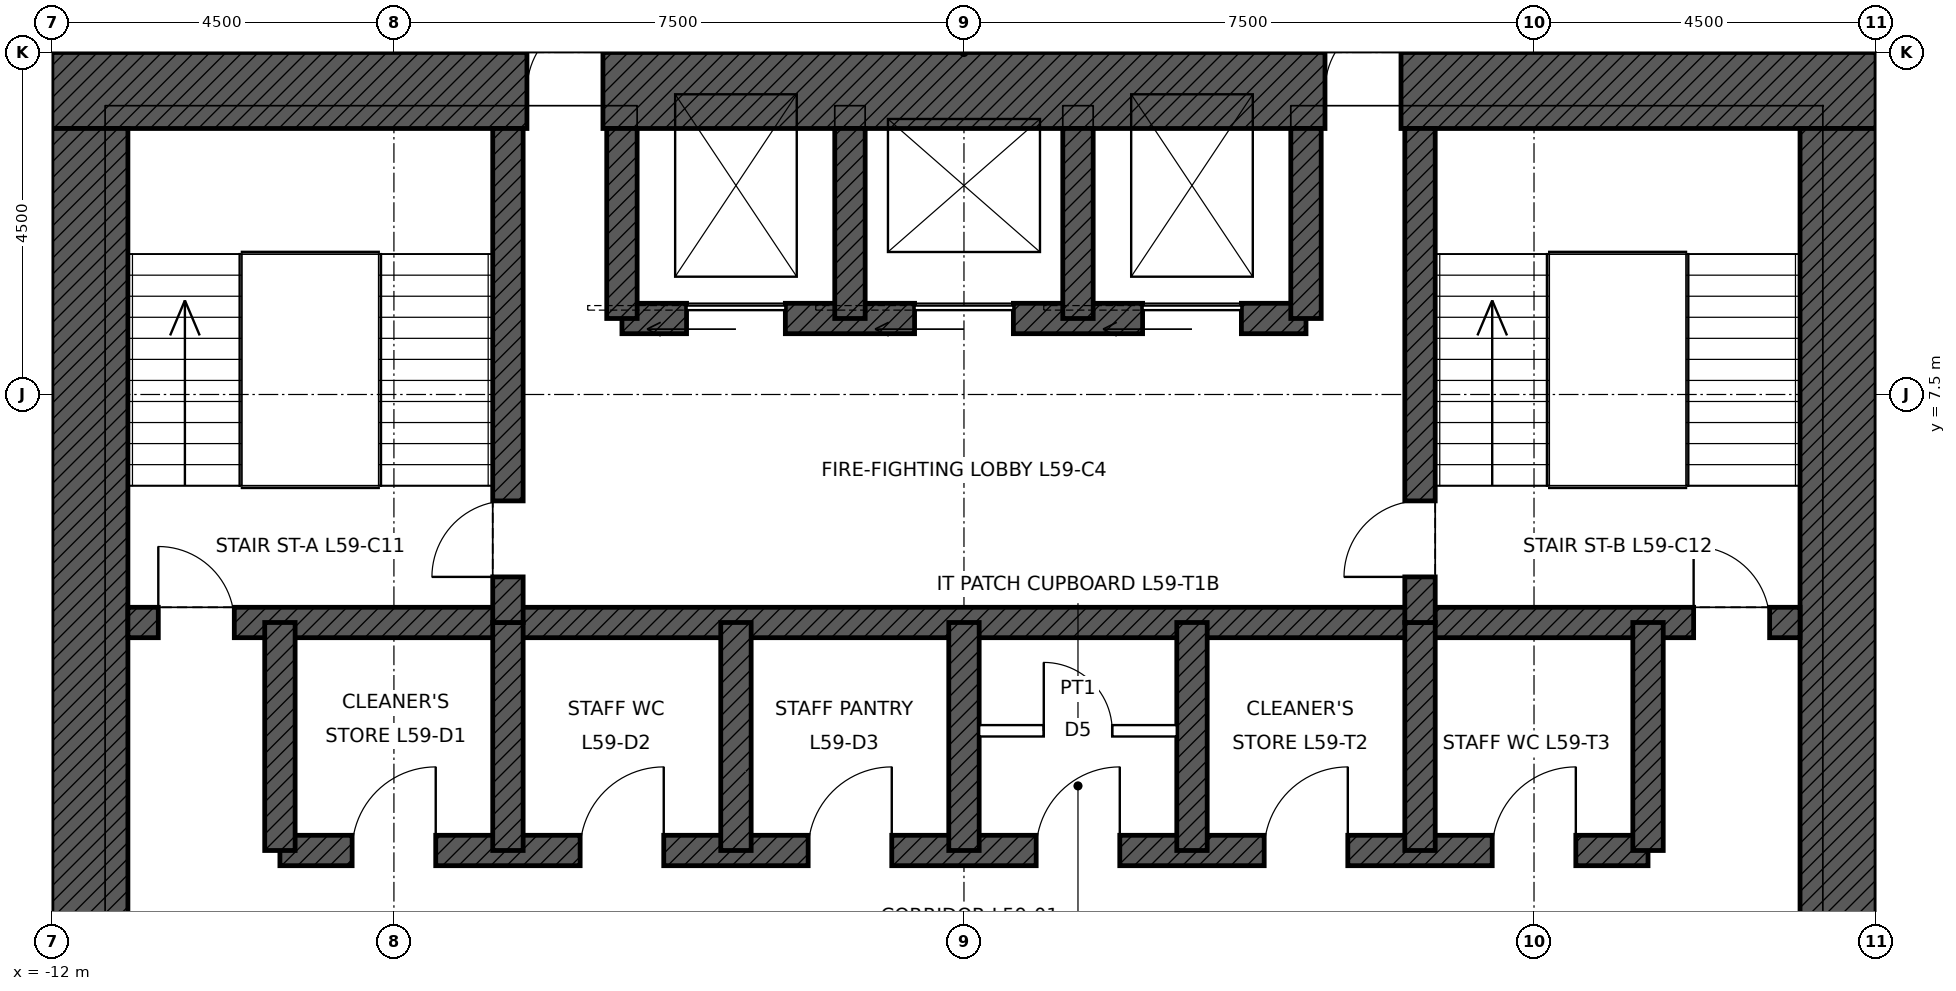
"""IFC4 building model, lengths in metres.
Left out: names, types, materials, properties, quantities, classifications, styles, units other than length and angle.
Written with IfcOpenShell. Run it as: python <this file> out.ifc"""

import sys

from ifc_helpers import new_model, si_unit, direction, frame, frame_2d, origin, place, context, subcontext, project, spatial, rectangle, extrude, element, fill, save


model = new_model("IFC4")
c1 = context("Model", 3, precision=1e-05, world=origin(), true_north=direction((0.0, 1.0)))
c2 = subcontext(c1, "Body", "Model", "MODEL_VIEW")
j1 = project(units=[si_unit("LENGTHUNIT", "METRE"), si_unit("PLANEANGLEUNIT", "RADIAN")], contexts=[c1])
p1 = place(None, origin())
s1 = spatial("IfcSite", under=j1, at=p1, CompositionType="ELEMENT")
p2 = place(p1, origin())
s2 = spatial("IfcBuilding", under=s1, at=p2, CompositionType="ELEMENT")
p3 = place(p2, frame((0.0, 0.0, 271.9)))
s3 = spatial("IfcBuildingStorey", under=s2, at=p3, CompositionType="ELEMENT", Elevation=271.9)
p4 = place(p3, frame((-12.0, 11.5, 0.0), z_axis=(0.0, 0.0, 1.0), x_axis=(1.0, 0.0, 0.0)))
e1 = element("IfcWall", 1, at=p4, inside=s3, PredefinedType="SHEAR", context=c2, shape_type="SweptSolid", body=[
    extrude(rectangle(XDim=24.0, YDim=1.0, at=frame_2d((12.0, 0.0))), origin(), (0.0, 0.0, 1.0), 4.0),
])
p5 = place(p4, frame((6.25, 0.0, 0.0)))
e2 = element("IfcOpeningElement", 2, at=p5, cuts=e1, PredefinedType="OPENING", context=c2, shape_type="SweptSolid", body=[
    extrude(rectangle(XDim=1.0, YDim=2.4, at=frame_2d((0.5, 1.2))), frame((0.0, 0.51, 0.0), z_axis=(0.0, -1.0, 0.0), x_axis=(1.0, 0.0, 0.0)), (0.0, 0.0, 1.0), 1.02),
])
p6 = place(p4, frame((16.75, 0.0, 0.0)))
e3 = element("IfcOpeningElement", 3, at=p6, cuts=e1, PredefinedType="OPENING", context=c2, shape_type="SweptSolid", body=[
    extrude(rectangle(XDim=1.0, YDim=2.4, at=frame_2d((0.5, 1.2))), frame((0.0, 0.51, 0.0), z_axis=(0.0, -1.0, 0.0), x_axis=(1.0, 0.0, 0.0)), (0.0, 0.0, 1.0), 1.02),
])
p7 = place(p3, frame((11.5, 11.0, 0.0), z_axis=(0.0, 0.0, 1.0), x_axis=(0.0, -1.0, 0.0)))
e4 = element("IfcWall", 4, at=p7, inside=s3, PredefinedType="SHEAR", context=c2, shape_type="SweptSolid", body=[
    extrude(rectangle(XDim=22.0, YDim=1.0, at=frame_2d((11.0, 0.0))), origin(), (0.0, 0.0, 1.0), 4.0),
])
p8 = place(p7, frame((10.5, 0.0, 0.0)))
e5 = element("IfcOpeningElement", 5, at=p8, cuts=e4, PredefinedType="OPENING", context=c2, shape_type="SweptSolid", body=[
    extrude(rectangle(XDim=1.0, YDim=2.4, at=frame_2d((0.5, 1.2))), frame((0.0, 0.51, 0.0), z_axis=(0.0, -1.0, 0.0), x_axis=(1.0, 0.0, 0.0)), (0.0, 0.0, 1.0), 1.02),
])
p9 = place(p3, frame((-11.5, -11.0, 0.0), z_axis=(0.0, 0.0, 1.0), x_axis=(0.0, 1.0, 0.0)))
e6 = element("IfcWall", 6, at=p9, inside=s3, PredefinedType="SHEAR", context=c2, shape_type="SweptSolid", body=[
    extrude(rectangle(XDim=22.0, YDim=1.0, at=frame_2d((11.0, 0.0))), origin(), (0.0, 0.0, 1.0), 4.0),
])
p10 = place(p9, frame((10.5, 0.0, 0.0)))
e7 = element("IfcOpeningElement", 7, at=p10, cuts=e6, PredefinedType="OPENING", context=c2, shape_type="SweptSolid", body=[
    extrude(rectangle(XDim=1.0, YDim=2.4, at=frame_2d((0.5, 1.2))), frame((0.0, 0.51, 0.0), z_axis=(0.0, -1.0, 0.0), x_axis=(1.0, 0.0, 0.0)), (0.0, 0.0, 1.0), 1.02),
])
p11 = place(p3, frame((-11.0, 4.5, 0.0), z_axis=(0.0, 0.0, 1.0), x_axis=(1.0, 0.0, 0.0)))
e8 = element("IfcWall", 8, at=p11, inside=s3, PredefinedType="SHEAR", context=c2, shape_type="SweptSolid", body=[
    extrude(rectangle(XDim=22.0, YDim=0.4, at=frame_2d((11.0, 0.0))), origin(), (0.0, 0.0, 1.0), 4.0),
])
p12 = place(p11, frame((0.4, 0.0, 0.0)))
e9 = element("IfcOpeningElement", 9, at=p12, cuts=e8, PredefinedType="OPENING", context=c2, shape_type="SweptSolid", body=[
    extrude(rectangle(XDim=1.0, YDim=2.1, at=frame_2d((0.5, 1.05))), frame((0.0, 0.21, 0.0), z_axis=(0.0, -1.0, 0.0), x_axis=(1.0, 0.0, 0.0)), (0.0, 0.0, 1.0), 0.42),
])
p13 = place(p11, frame((20.6, 0.0, 0.0)))
e10 = element("IfcOpeningElement", 10, at=p13, cuts=e8, PredefinedType="OPENING", context=c2, shape_type="SweptSolid", body=[
    extrude(rectangle(XDim=1.0, YDim=2.1, at=frame_2d((0.5, 1.05))), frame((0.0, 0.21, 0.0), z_axis=(0.0, -1.0, 0.0), x_axis=(1.0, 0.0, 0.0)), (0.0, 0.0, 1.0), 0.42),
])
p14 = place(p3, frame((-9.0, 1.5, 0.0), z_axis=(0.0, 0.0, 1.0), x_axis=(1.0, 0.0, 0.0)))
e11 = element("IfcWall", 11, at=p14, inside=s3, PredefinedType="SHEAR", context=c2, shape_type="SweptSolid", body=[
    extrude(rectangle(XDim=18.0, YDim=0.4, at=frame_2d((9.0, 0.0))), origin(), (0.0, 0.0, 1.0), 4.0),
])
p15 = place(p14, frame((0.95, 0.0, 0.0)))
e12 = element("IfcOpeningElement", 12, at=p15, cuts=e11, PredefinedType="OPENING", context=c2, shape_type="SweptSolid", body=[
    extrude(rectangle(XDim=1.1, YDim=2.1, at=frame_2d((0.55, 1.05))), frame((0.0, 0.21, 0.0), z_axis=(0.0, -1.0, 0.0), x_axis=(1.0, 0.0, 0.0)), (0.0, 0.0, 1.0), 0.42),
])
p16 = place(p14, frame((3.95, 0.0, 0.0)))
e13 = element("IfcOpeningElement", 13, at=p16, cuts=e11, PredefinedType="OPENING", context=c2, shape_type="SweptSolid", body=[
    extrude(rectangle(XDim=1.1, YDim=2.1, at=frame_2d((0.55, 1.05))), frame((0.0, 0.21, 0.0), z_axis=(0.0, -1.0, 0.0), x_axis=(1.0, 0.0, 0.0)), (0.0, 0.0, 1.0), 0.42),
])
p17 = place(p14, frame((6.95, 0.0, 0.0)))
e14 = element("IfcOpeningElement", 14, at=p17, cuts=e11, PredefinedType="OPENING", context=c2, shape_type="SweptSolid", body=[
    extrude(rectangle(XDim=1.1, YDim=2.1, at=frame_2d((0.55, 1.05))), frame((0.0, 0.21, 0.0), z_axis=(0.0, -1.0, 0.0), x_axis=(1.0, 0.0, 0.0)), (0.0, 0.0, 1.0), 0.42),
])
p18 = place(p14, frame((9.95, 0.0, 0.0)))
e15 = element("IfcOpeningElement", 15, at=p18, cuts=e11, PredefinedType="OPENING", context=c2, shape_type="SweptSolid", body=[
    extrude(rectangle(XDim=1.1, YDim=2.1, at=frame_2d((0.55, 1.05))), frame((0.0, 0.21, 0.0), z_axis=(0.0, -1.0, 0.0), x_axis=(1.0, 0.0, 0.0)), (0.0, 0.0, 1.0), 0.42),
])
p19 = place(p14, frame((12.95, 0.0, 0.0)))
e16 = element("IfcOpeningElement", 16, at=p19, cuts=e11, PredefinedType="OPENING", context=c2, shape_type="SweptSolid", body=[
    extrude(rectangle(XDim=1.1, YDim=2.1, at=frame_2d((0.55, 1.05))), frame((0.0, 0.21, 0.0), z_axis=(0.0, -1.0, 0.0), x_axis=(1.0, 0.0, 0.0)), (0.0, 0.0, 1.0), 0.42),
])
p20 = place(p14, frame((15.95, 0.0, 0.0)))
e17 = element("IfcOpeningElement", 17, at=p20, cuts=e11, PredefinedType="OPENING", context=c2, shape_type="SweptSolid", body=[
    extrude(rectangle(XDim=1.1, YDim=2.1, at=frame_2d((0.55, 1.05))), frame((0.0, 0.21, 0.0), z_axis=(0.0, -1.0, 0.0), x_axis=(1.0, 0.0, 0.0)), (0.0, 0.0, 1.0), 0.42),
])
p21 = place(p3, frame((-4.5, 8.5, 0.0), z_axis=(0.0, 0.0, 1.0), x_axis=(1.0, 0.0, 0.0)))
e18 = element("IfcWall", 18, at=p21, inside=s3, PredefinedType="SHEAR", context=c2, shape_type="SweptSolid", body=[
    extrude(rectangle(XDim=9.0, YDim=0.4, at=frame_2d((4.5, 0.0))), origin(), (0.0, 0.0, 1.0), 4.0),
])
p22 = place(p21, frame((0.85, 0.0, 0.0)))
e19 = element("IfcOpeningElement", 19, at=p22, cuts=e18, PredefinedType="OPENING", context=c2, shape_type="SweptSolid", body=[
    extrude(rectangle(XDim=1.3, YDim=2.4, at=frame_2d((0.65, 1.2))), frame((0.0, 0.21, 0.0), z_axis=(0.0, -1.0, 0.0), x_axis=(1.0, 0.0, 0.0)), (0.0, 0.0, 1.0), 0.42),
])
p23 = place(p21, frame((6.85, 0.0, 0.0)))
e20 = element("IfcOpeningElement", 20, at=p23, cuts=e18, PredefinedType="OPENING", context=c2, shape_type="SweptSolid", body=[
    extrude(rectangle(XDim=1.3, YDim=2.4, at=frame_2d((0.65, 1.2))), frame((0.0, 0.21, 0.0), z_axis=(0.0, -1.0, 0.0), x_axis=(1.0, 0.0, 0.0)), (0.0, 0.0, 1.0), 0.42),
])
p24 = place(p21, frame((3.85, 0.0, 0.0)))
e21 = element("IfcOpeningElement", 21, at=p24, cuts=e18, PredefinedType="OPENING", context=c2, shape_type="SweptSolid", body=[
    extrude(rectangle(XDim=1.3, YDim=2.4, at=frame_2d((0.65, 1.2))), frame((0.0, 0.21, 0.0), z_axis=(0.0, -1.0, 0.0), x_axis=(1.0, 0.0, 0.0)), (0.0, 0.0, 1.0), 0.42),
])
for number, where, z_axis, x_axis in (
    (22, (-9.0, 1.5, 0.0), (0.0, 0.0, 1.0), (0.0, 1.0, 0.0)),
    (23, (9.0, 1.5, 0.0), (0.0, 0.0, 1.0), (0.0, 1.0, 0.0)),
    (24, (-6.0, 1.5, 0.0), (0.0, 0.0, 1.0), (0.0, 1.0, 0.0)),
    (25, (-3.0, 1.5, 0.0), (0.0, 0.0, 1.0), (0.0, 1.0, 0.0)),
    (26, (0.0, 1.5, 0.0), (0.0, 0.0, 1.0), (0.0, 1.0, 0.0)),
    (27, (3.0, 1.5, 0.0), (0.0, 0.0, 1.0), (0.0, 1.0, 0.0)),
    (28, (6.0, 1.5, 0.0), (0.0, 0.0, 1.0), (0.0, 1.0, 0.0)),
):
    element("IfcWall", number, at=place(p3, frame(where, z_axis=z_axis, x_axis=x_axis)), inside=s3, PredefinedType="SHEAR", context=c2, shape_type="SweptSolid", body=[
        extrude(rectangle(XDim=3.0, YDim=0.4, at=frame_2d((1.5, 0.0))), origin(), (0.0, 0.0, 1.0), 4.0),
    ])
p25 = place(p3, frame((-6.0, 4.5, 0.0), z_axis=(0.0, 0.0, 1.0), x_axis=(0.0, 1.0, 0.0)))
e29 = element("IfcWall", 29, at=p25, inside=s3, PredefinedType="SHEAR", context=c2, shape_type="SweptSolid", body=[
    extrude(rectangle(XDim=6.5, YDim=0.4, at=frame_2d((3.25, 0.0))), origin(), (0.0, 0.0, 1.0), 4.0),
])
p26 = place(p25, frame((0.6, 0.0, 0.0)))
e30 = element("IfcOpeningElement", 30, at=p26, cuts=e29, PredefinedType="OPENING", context=c2, shape_type="SweptSolid", body=[
    extrude(rectangle(XDim=1.0, YDim=2.1, at=frame_2d((0.5, 1.05))), frame((0.0, 0.21, 0.0), z_axis=(0.0, -1.0, 0.0), x_axis=(1.0, 0.0, 0.0)), (0.0, 0.0, 1.0), 0.42),
])
p27 = place(p3, frame((6.0, 4.5, 0.0), z_axis=(0.0, 0.0, 1.0), x_axis=(0.0, 1.0, 0.0)))
e31 = element("IfcWall", 31, at=p27, inside=s3, PredefinedType="SHEAR", context=c2, shape_type="SweptSolid", body=[
    extrude(rectangle(XDim=6.5, YDim=0.4, at=frame_2d((3.25, 0.0))), origin(), (0.0, 0.0, 1.0), 4.0),
])
p28 = place(p27, frame((0.6, 0.0, 0.0)))
e32 = element("IfcOpeningElement", 32, at=p28, cuts=e31, PredefinedType="OPENING", context=c2, shape_type="SweptSolid", body=[
    extrude(rectangle(XDim=1.0, YDim=2.1, at=frame_2d((0.5, 1.05))), frame((0.0, 0.21, 0.0), z_axis=(0.0, -1.0, 0.0), x_axis=(1.0, 0.0, 0.0)), (0.0, 0.0, 1.0), 0.42),
])
for number, where, z_axis, x_axis in (
    (33, (-4.5, 8.5, 0.0), (0.0, 0.0, 1.0), (0.0, 1.0, 0.0)),
    (34, (4.5, 8.5, 0.0), (0.0, 0.0, 1.0), (0.0, 1.0, 0.0)),
    (35, (-1.5, 8.5, 0.0), (0.0, 0.0, 1.0), (0.0, 1.0, 0.0)),
    (36, (1.5, 8.5, 0.0), (0.0, 0.0, 1.0), (0.0, 1.0, 0.0)),
):
    element("IfcWall", number, at=place(p3, frame(where, z_axis=z_axis, x_axis=x_axis)), inside=s3, PredefinedType="SHEAR", context=c2, shape_type="SweptSolid", body=[
        extrude(rectangle(XDim=2.5, YDim=0.4, at=frame_2d((1.25, 0.0))), origin(), (0.0, 0.0, 1.0), 4.0),
    ])
p29 = place(p3, frame((0.2, 3.075, 0.0), z_axis=(0.0, 0.0, 1.0), x_axis=(1.0, 0.0, 0.0)))
e37 = element("IfcWall", 37, at=p29, inside=s3, PredefinedType="PARTITIONING", context=c2, shape_type="SweptSolid", body=[
    extrude(rectangle(XDim=2.6, YDim=0.15, at=frame_2d((1.3, 0.0))), origin(), (0.0, 0.0, 1.0), 3.75),
])
p30 = place(p29, frame((0.85, 0.0, 0.0)))
e38 = element("IfcOpeningElement", 38, at=p30, cuts=e37, PredefinedType="OPENING", context=c2, shape_type="SweptSolid", body=[
    extrude(rectangle(XDim=0.9, YDim=2.1, at=frame_2d((0.45, 1.05))), frame((0.0, 0.085, 0.0), z_axis=(0.0, -1.0, 0.0), x_axis=(1.0, 0.0, 0.0)), (0.0, 0.0, 1.0), 0.17),
])
p31 = place(p12, origin())
e39 = element("IfcDoor", 39, at=p31, inside=s3, OperationType="SINGLE_SWING_LEFT", PredefinedType="DOOR", context=c2, shape_type="SweptSolid", body=[
    extrude(rectangle(XDim=1.0, YDim=2.1, at=frame_2d((0.5, 1.05))), frame((0.0, 0.025, 0.0), z_axis=(0.0, -1.0, 0.0), x_axis=(1.0, 0.0, 0.0)), (0.0, 0.0, 1.0), 0.05),
])
fill(e9, e39)
p32 = place(p13, origin())
e40 = element("IfcDoor", 40, at=p32, inside=s3, OperationType="SINGLE_SWING_LEFT", PredefinedType="DOOR", context=c2, shape_type="SweptSolid", body=[
    extrude(rectangle(XDim=1.0, YDim=2.1, at=frame_2d((0.5, 1.05))), frame((0.0, 0.025, 0.0), z_axis=(0.0, -1.0, 0.0), x_axis=(1.0, 0.0, 0.0)), (0.0, 0.0, 1.0), 0.05),
])
fill(e10, e40)
p33 = place(p26, origin())
e41 = element("IfcDoor", 41, at=p33, inside=s3, OperationType="SINGLE_SWING_LEFT", PredefinedType="DOOR", context=c2, shape_type="SweptSolid", body=[
    extrude(rectangle(XDim=1.0, YDim=2.1, at=frame_2d((0.5, 1.05))), frame((0.0, 0.025, 0.0), z_axis=(0.0, -1.0, 0.0), x_axis=(1.0, 0.0, 0.0)), (0.0, 0.0, 1.0), 0.05),
])
fill(e30, e41)
p34 = place(p28, origin())
e42 = element("IfcDoor", 42, at=p34, inside=s3, OperationType="SINGLE_SWING_LEFT", PredefinedType="DOOR", context=c2, shape_type="SweptSolid", body=[
    extrude(rectangle(XDim=1.0, YDim=2.1, at=frame_2d((0.5, 1.05))), frame((0.0, 0.025, 0.0), z_axis=(0.0, -1.0, 0.0), x_axis=(1.0, 0.0, 0.0)), (0.0, 0.0, 1.0), 0.05),
])
fill(e32, e42)
p35 = place(p5, origin())
e43 = element("IfcDoor", 43, at=p35, inside=s3, OperationType="SINGLE_SWING_RIGHT", PredefinedType="DOOR", context=c2, shape_type="SweptSolid", body=[
    extrude(rectangle(XDim=1.0, YDim=2.4, at=frame_2d((0.5, 1.2))), frame((0.0, 0.485, 0.0), z_axis=(0.0, -1.0, 0.0), x_axis=(1.0, 0.0, 0.0)), (0.0, 0.0, 1.0), 0.05),
])
fill(e2, e43)
p36 = place(p6, origin())
e44 = element("IfcDoor", 44, at=p36, inside=s3, OperationType="SINGLE_SWING_RIGHT", PredefinedType="DOOR", context=c2, shape_type="SweptSolid", body=[
    extrude(rectangle(XDim=1.0, YDim=2.4, at=frame_2d((0.5, 1.2))), frame((0.0, 0.485, 0.0), z_axis=(0.0, -1.0, 0.0), x_axis=(1.0, 0.0, 0.0)), (0.0, 0.0, 1.0), 0.05),
])
fill(e3, e44)
p37 = place(p22, origin())
e45 = element("IfcDoor", 45, at=p37, inside=s3, OperationType="SLIDING_TO_LEFT", PredefinedType="DOOR", context=c2, shape_type="SweptSolid", body=[
    extrude(rectangle(XDim=1.3, YDim=2.4, at=frame_2d((0.65, 1.2))), frame((0.0, 0.025, 0.0), z_axis=(0.0, -1.0, 0.0), x_axis=(1.0, 0.0, 0.0)), (0.0, 0.0, 1.0), 0.05),
])
fill(e19, e45)
p38 = place(p23, origin())
e46 = element("IfcDoor", 46, at=p38, inside=s3, OperationType="SLIDING_TO_LEFT", PredefinedType="DOOR", context=c2, shape_type="SweptSolid", body=[
    extrude(rectangle(XDim=1.3, YDim=2.4, at=frame_2d((0.65, 1.2))), frame((0.0, 0.025, 0.0), z_axis=(0.0, -1.0, 0.0), x_axis=(1.0, 0.0, 0.0)), (0.0, 0.0, 1.0), 0.05),
])
fill(e20, e46)
p39 = place(p24, origin())
e47 = element("IfcDoor", 47, at=p39, inside=s3, OperationType="SLIDING_TO_LEFT", PredefinedType="DOOR", context=c2, shape_type="SweptSolid", body=[
    extrude(rectangle(XDim=1.3, YDim=2.4, at=frame_2d((0.65, 1.2))), frame((0.0, 0.025, 0.0), z_axis=(0.0, -1.0, 0.0), x_axis=(1.0, 0.0, 0.0)), (0.0, 0.0, 1.0), 0.05),
])
fill(e21, e47)
p40 = place(p15, origin())
e48 = element("IfcDoor", 48, at=p40, inside=s3, OperationType="SINGLE_SWING_RIGHT", PredefinedType="DOOR", context=c2, shape_type="SweptSolid", body=[
    extrude(rectangle(XDim=1.1, YDim=2.1, at=frame_2d((0.55, 1.05))), frame((0.0, 0.025, 0.0), z_axis=(0.0, -1.0, 0.0), x_axis=(1.0, 0.0, 0.0)), (0.0, 0.0, 1.0), 0.05),
])
fill(e12, e48)
p41 = place(p16, origin())
e49 = element("IfcDoor", 49, at=p41, inside=s3, OperationType="SINGLE_SWING_RIGHT", PredefinedType="DOOR", context=c2, shape_type="SweptSolid", body=[
    extrude(rectangle(XDim=1.1, YDim=2.1, at=frame_2d((0.55, 1.05))), frame((0.0, 0.025, 0.0), z_axis=(0.0, -1.0, 0.0), x_axis=(1.0, 0.0, 0.0)), (0.0, 0.0, 1.0), 0.05),
])
fill(e13, e49)
p42 = place(p17, origin())
e50 = element("IfcDoor", 50, at=p42, inside=s3, OperationType="SINGLE_SWING_RIGHT", PredefinedType="DOOR", context=c2, shape_type="SweptSolid", body=[
    extrude(rectangle(XDim=1.1, YDim=2.1, at=frame_2d((0.55, 1.05))), frame((0.0, 0.025, 0.0), z_axis=(0.0, -1.0, 0.0), x_axis=(1.0, 0.0, 0.0)), (0.0, 0.0, 1.0), 0.05),
])
fill(e14, e50)
p43 = place(p18, origin())
e51 = element("IfcDoor", 51, at=p43, inside=s3, OperationType="SINGLE_SWING_RIGHT", PredefinedType="DOOR", context=c2, shape_type="SweptSolid", body=[
    extrude(rectangle(XDim=1.1, YDim=2.1, at=frame_2d((0.55, 1.05))), frame((0.0, 0.025, 0.0), z_axis=(0.0, -1.0, 0.0), x_axis=(1.0, 0.0, 0.0)), (0.0, 0.0, 1.0), 0.05),
])
fill(e15, e51)
p44 = place(p30, origin())
e52 = element("IfcDoor", 52, at=p44, inside=s3, OperationType="SINGLE_SWING_LEFT", PredefinedType="DOOR", context=c2, shape_type="SweptSolid", body=[
    extrude(rectangle(XDim=0.9, YDim=2.1, at=frame_2d((0.45, 1.05))), frame((0.0, 0.025, 0.0), z_axis=(0.0, -1.0, 0.0), x_axis=(1.0, 0.0, 0.0)), (0.0, 0.0, 1.0), 0.05),
])
fill(e38, e52)
p45 = place(p19, origin())
e53 = element("IfcDoor", 53, at=p45, inside=s3, OperationType="SINGLE_SWING_RIGHT", PredefinedType="DOOR", context=c2, shape_type="SweptSolid", body=[
    extrude(rectangle(XDim=1.1, YDim=2.1, at=frame_2d((0.55, 1.05))), frame((0.0, 0.025, 0.0), z_axis=(0.0, -1.0, 0.0), x_axis=(1.0, 0.0, 0.0)), (0.0, 0.0, 1.0), 0.05),
])
fill(e16, e53)
p46 = place(p20, origin())
e54 = element("IfcDoor", 54, at=p46, inside=s3, OperationType="SINGLE_SWING_RIGHT", PredefinedType="DOOR", context=c2, shape_type="SweptSolid", body=[
    extrude(rectangle(XDim=1.1, YDim=2.1, at=frame_2d((0.55, 1.05))), frame((0.0, 0.025, 0.0), z_axis=(0.0, -1.0, 0.0), x_axis=(1.0, 0.0, 0.0)), (0.0, 0.0, 1.0), 0.05),
])
fill(e17, e54)
save(model, sys.argv[1])
